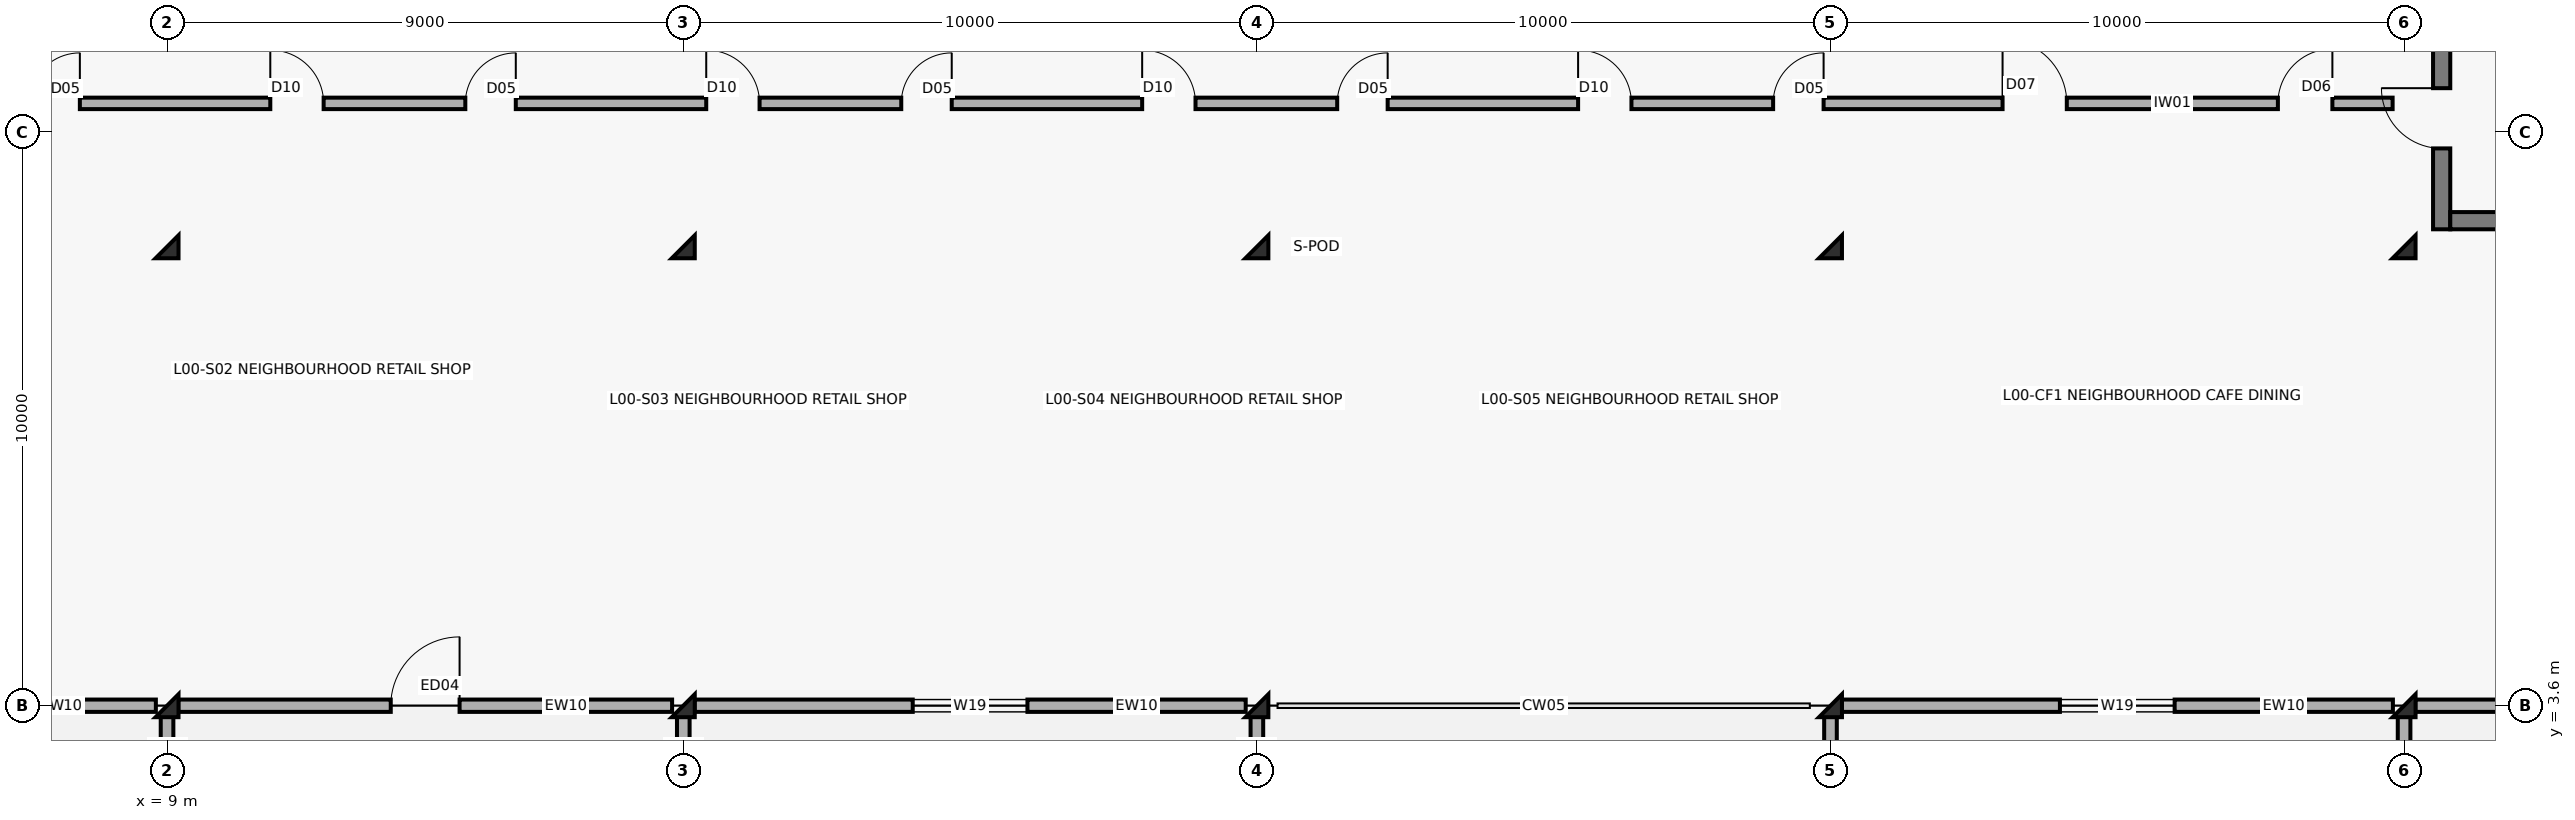
"""IFC4 building model, lengths in metres.
Left out: names, types, materials, properties, quantities, classifications, styles, units other than length and angle.
Written with IfcOpenShell. Run it as: python <this file> out.ifc"""

import sys

from ifc_helpers import new_model, si_unit, direction, frame, frame_2d, origin, origin_2d, place, context, subcontext, project, spatial, rectangle, extrude, element, fill, save


model = new_model("IFC4")
c1 = context("Model", 3, precision=1e-05, world=origin(), true_north=direction((0.0, 1.0)))
c2 = subcontext(c1, "Body", "Model", "MODEL_VIEW")
j1 = project(units=[si_unit("LENGTHUNIT", "METRE"), si_unit("PLANEANGLEUNIT", "RADIAN")], contexts=[c1])
p1 = place(None, origin())
s1 = spatial("IfcSite", under=j1, at=p1, CompositionType="ELEMENT")
p2 = place(p1, origin())
s2 = spatial("IfcBuilding", under=s1, at=p2, CompositionType="ELEMENT")
p3 = place(p2, origin())
s3 = spatial("IfcBuildingStorey", under=s2, at=p3, CompositionType="ELEMENT", Elevation=0.0)
for number, where, z_axis, x_axis in (
    (1, (9.0, 3.6, 0.0), (0.0, 0.0, 1.0), (1.0, 0.0, 0.0)),
    (2, (9.0, 11.6, 0.0), (0.0, 0.0, 1.0), (1.0, 0.0, 0.0)),
    (3, (18.0, 3.6, 0.0), (0.0, 0.0, 1.0), (1.0, 0.0, 0.0)),
    (4, (18.0, 11.6, 0.0), (0.0, 0.0, 1.0), (1.0, 0.0, 0.0)),
    (5, (28.0, 3.6, 0.0), (0.0, 0.0, 1.0), (1.0, 0.0, 0.0)),
    (6, (28.0, 11.6, 0.0), (0.0, 0.0, 1.0), (1.0, 0.0, 0.0)),
    (7, (38.0, 3.6, 0.0), (0.0, 0.0, 1.0), (1.0, 0.0, 0.0)),
    (8, (38.0, 11.6, 0.0), (0.0, 0.0, 1.0), (1.0, 0.0, 0.0)),
    (9, (48.0, 3.6, 0.0), (0.0, 0.0, 1.0), (1.0, 0.0, 0.0)),
    (10, (48.0, 11.6, 0.0), (0.0, 0.0, 1.0), (1.0, 0.0, 0.0)),
):
    element("IfcColumn", number, at=place(p3, frame(where, z_axis=z_axis, x_axis=x_axis)), inside=s3, PredefinedType="COLUMN", context=c2, shape_type="SweptSolid", body=[
        extrude(rectangle(XDim=0.4, YDim=0.4, at=origin_2d()), origin(), (0.0, 0.0, 1.0), 4.5),
    ])
p4 = place(p3, frame((0.195, 3.6, 0.0), z_axis=(0.0, 0.0, 1.0), x_axis=(1.0, 0.0, 0.0)))
e11 = element("IfcWall", 11, at=p4, inside=s3, PredefinedType="SOLIDWALL", context=c2, shape_type="SweptSolid", body=[
    extrude(rectangle(XDim=8.61, YDim=0.215, at=frame_2d((4.305, 0.0))), origin(), (0.0, 0.0, 1.0), 3.5),
])
p5 = place(p4, frame((3.305, 0.0, 0.45)))
e12 = element("IfcOpeningElement", 12, at=p5, cuts=e11, PredefinedType="OPENING", context=c2, shape_type="SweptSolid", body=[
    extrude(rectangle(XDim=2.0, YDim=2.2, at=frame_2d((1.0, 1.1))), frame((0.0, 0.117, 0.0), z_axis=(0.0, -1.0, 0.0), x_axis=(1.0, 0.0, 0.0)), (0.0, 0.0, 1.0), 0.235),
])
p6 = place(p3, frame((9.195, 3.6, 0.0), z_axis=(0.0, 0.0, 1.0), x_axis=(1.0, 0.0, 0.0)))
e13 = element("IfcWall", 13, at=p6, inside=s3, PredefinedType="SOLIDWALL", context=c2, shape_type="SweptSolid", body=[
    extrude(rectangle(XDim=8.61, YDim=0.215, at=frame_2d((4.305, 0.0))), origin(), (0.0, 0.0, 1.0), 3.5),
])
p7 = place(p6, frame((3.705, 0.0, 0.0)))
e14 = element("IfcOpeningElement", 14, at=p7, cuts=e13, PredefinedType="OPENING", context=c2, shape_type="SweptSolid", body=[
    extrude(rectangle(XDim=1.2, YDim=2.25, at=frame_2d((0.6, 1.125))), frame((0.0, 0.117, 0.0), z_axis=(0.0, -1.0, 0.0), x_axis=(1.0, 0.0, 0.0)), (0.0, 0.0, 1.0), 0.235),
])
p8 = place(p3, frame((18.195, 3.6, 0.0), z_axis=(0.0, 0.0, 1.0), x_axis=(1.0, 0.0, 0.0)))
e15 = element("IfcWall", 15, at=p8, inside=s3, PredefinedType="SOLIDWALL", context=c2, shape_type="SweptSolid", body=[
    extrude(rectangle(XDim=9.61, YDim=0.215, at=frame_2d((4.805, 0.0))), origin(), (0.0, 0.0, 1.0), 3.5),
])
p9 = place(p8, frame((3.805, 0.0, 0.45)))
e16 = element("IfcOpeningElement", 16, at=p9, cuts=e15, PredefinedType="OPENING", context=c2, shape_type="SweptSolid", body=[
    extrude(rectangle(XDim=2.0, YDim=2.2, at=frame_2d((1.0, 1.1))), frame((0.0, 0.117, 0.0), z_axis=(0.0, -1.0, 0.0), x_axis=(1.0, 0.0, 0.0)), (0.0, 0.0, 1.0), 0.235),
])
p10 = place(p3, frame((38.195, 3.6, 0.0), z_axis=(0.0, 0.0, 1.0), x_axis=(1.0, 0.0, 0.0)))
e17 = element("IfcWall", 17, at=p10, inside=s3, PredefinedType="SOLIDWALL", context=c2, shape_type="SweptSolid", body=[
    extrude(rectangle(XDim=9.61, YDim=0.215, at=frame_2d((4.805, 0.0))), origin(), (0.0, 0.0, 1.0), 3.5),
])
p11 = place(p10, frame((3.805, 0.0, 0.45)))
e18 = element("IfcOpeningElement", 18, at=p11, cuts=e17, PredefinedType="OPENING", context=c2, shape_type="SweptSolid", body=[
    extrude(rectangle(XDim=2.0, YDim=2.2, at=frame_2d((1.0, 1.1))), frame((0.0, 0.117, 0.0), z_axis=(0.0, -1.0, 0.0), x_axis=(1.0, 0.0, 0.0)), (0.0, 0.0, 1.0), 0.235),
])
p12 = place(p3, frame((48.195, 3.6, 0.0), z_axis=(0.0, 0.0, 1.0), x_axis=(1.0, 0.0, 0.0)))
e19 = element("IfcWall", 19, at=p12, inside=s3, PredefinedType="SOLIDWALL", context=c2, shape_type="SweptSolid", body=[
    extrude(rectangle(XDim=9.61, YDim=0.215, at=frame_2d((4.805, 0.0))), origin(), (0.0, 0.0, 1.0), 3.5),
])
p13 = place(p12, frame((4.205, 0.0, 0.0)))
e20 = element("IfcOpeningElement", 20, at=p13, cuts=e19, PredefinedType="OPENING", context=c2, shape_type="SweptSolid", body=[
    extrude(rectangle(XDim=1.2, YDim=2.25, at=frame_2d((0.6, 1.125))), frame((0.0, 0.117, 0.0), z_axis=(0.0, -1.0, 0.0), x_axis=(1.0, 0.0, 0.0)), (0.0, 0.0, 1.0), 0.235),
])
for number, where, z_axis, x_axis in (
    (21, (9.0, 2.55, 0.0), (0.0, 0.0, 1.0), (0.0, 1.0, 0.0)),
    (22, (18.0, 2.55, 0.0), (0.0, 0.0, 1.0), (0.0, 1.0, 0.0)),
    (23, (28.0, 2.55, 0.0), (0.0, 0.0, 1.0), (0.0, 1.0, 0.0)),
    (24, (38.0, 2.55, 0.0), (0.0, 0.0, 1.0), (0.0, 1.0, 0.0)),
    (25, (48.0, 2.55, 0.0), (0.0, 0.0, 1.0), (0.0, 1.0, 0.0)),
):
    element("IfcWall", number, at=place(p3, frame(where, z_axis=z_axis, x_axis=x_axis)), inside=s3, PredefinedType="PARAPET", context=c2, shape_type="SweptSolid", body=[
        extrude(rectangle(XDim=0.87, YDim=0.22, at=frame_2d((0.435, 0.0))), origin(), (0.0, 0.0, 1.0), 4.5),
    ])
p14 = place(p3, frame((48.655, 11.905, 0.0), z_axis=(0.0, 0.0, 1.0), x_axis=(0.0, 1.0, 0.0)))
e26 = element("IfcWall", 26, at=p14, inside=s3, PredefinedType="SHEAR", context=c2, shape_type="SweptSolid", body=[
    extrude(rectangle(XDim=3.87, YDim=0.3, at=frame_2d((1.935, 0.0))), origin(), (0.0, 0.0, 1.0), 4.5),
])
p15 = place(p14, frame((1.41, 0.0, 0.0)))
e27 = element("IfcOpeningElement", 27, at=p15, cuts=e26, PredefinedType="OPENING", context=c2, shape_type="SweptSolid", body=[
    extrude(rectangle(XDim=1.05, YDim=2.15, at=frame_2d((0.525, 1.075))), frame((0.0, 0.16, 0.0), z_axis=(0.0, -1.0, 0.0), x_axis=(1.0, 0.0, 0.0)), (0.0, 0.0, 1.0), 0.32),
])
p16 = place(p3, frame((48.805, 12.055, 0.0), z_axis=(0.0, 0.0, 1.0), x_axis=(1.0, 0.0, 0.0)))
e28 = element("IfcWall", 28, at=p16, inside=s3, PredefinedType="SHEAR", context=c2, shape_type="SweptSolid", body=[
    extrude(rectangle(XDim=7.69, YDim=0.3, at=frame_2d((3.845, 0.0))), origin(), (0.0, 0.0, 1.0), 4.5),
])
p17 = place(p3, frame((1.0, 14.1, 0.0), z_axis=(0.0, 0.0, 1.0), x_axis=(1.0, 0.0, 0.0)))
e29 = element("IfcWall", 29, at=p17, inside=s3, PredefinedType="SOLIDWALL", context=c2, shape_type="SweptSolid", body=[
    extrude(rectangle(XDim=46.8, YDim=0.2, at=frame_2d((23.4, 0.0))), origin(), (0.0, 0.0, 1.0), 3.6),
])
p18 = place(p17, frame((2.2, 0.0, 0.0)))
e30 = element("IfcOpeningElement", 30, at=p18, cuts=e29, PredefinedType="OPENING", context=c2, shape_type="SweptSolid", body=[
    extrude(rectangle(XDim=0.93, YDim=2.1, at=frame_2d((0.465, 1.05))), frame((0.0, 0.11, 0.0), z_axis=(0.0, -1.0, 0.0), x_axis=(1.0, 0.0, 0.0)), (0.0, 0.0, 1.0), 0.22),
])
p19 = place(p17, frame((5.6, 0.0, 0.0)))
e31 = element("IfcOpeningElement", 31, at=p19, cuts=e29, PredefinedType="OPENING", context=c2, shape_type="SweptSolid", body=[
    extrude(rectangle(XDim=0.88, YDim=2.1, at=frame_2d((0.44, 1.05))), frame((0.0, 0.11, 0.0), z_axis=(0.0, -1.0, 0.0), x_axis=(1.0, 0.0, 0.0)), (0.0, 0.0, 1.0), 0.22),
])
p20 = place(p17, frame((9.8, 0.0, 0.0)))
e32 = element("IfcOpeningElement", 32, at=p20, cuts=e29, PredefinedType="OPENING", context=c2, shape_type="SweptSolid", body=[
    extrude(rectangle(XDim=0.93, YDim=2.1, at=frame_2d((0.465, 1.05))), frame((0.0, 0.11, 0.0), z_axis=(0.0, -1.0, 0.0), x_axis=(1.0, 0.0, 0.0)), (0.0, 0.0, 1.0), 0.22),
])
p21 = place(p17, frame((13.2, 0.0, 0.0)))
e33 = element("IfcOpeningElement", 33, at=p21, cuts=e29, PredefinedType="OPENING", context=c2, shape_type="SweptSolid", body=[
    extrude(rectangle(XDim=0.88, YDim=2.1, at=frame_2d((0.44, 1.05))), frame((0.0, 0.11, 0.0), z_axis=(0.0, -1.0, 0.0), x_axis=(1.0, 0.0, 0.0)), (0.0, 0.0, 1.0), 0.22),
])
p22 = place(p17, frame((17.4, 0.0, 0.0)))
e34 = element("IfcOpeningElement", 34, at=p22, cuts=e29, PredefinedType="OPENING", context=c2, shape_type="SweptSolid", body=[
    extrude(rectangle(XDim=0.93, YDim=2.1, at=frame_2d((0.465, 1.05))), frame((0.0, 0.11, 0.0), z_axis=(0.0, -1.0, 0.0), x_axis=(1.0, 0.0, 0.0)), (0.0, 0.0, 1.0), 0.22),
])
p23 = place(p17, frame((20.8, 0.0, 0.0)))
e35 = element("IfcOpeningElement", 35, at=p23, cuts=e29, PredefinedType="OPENING", context=c2, shape_type="SweptSolid", body=[
    extrude(rectangle(XDim=0.88, YDim=2.1, at=frame_2d((0.44, 1.05))), frame((0.0, 0.11, 0.0), z_axis=(0.0, -1.0, 0.0), x_axis=(1.0, 0.0, 0.0)), (0.0, 0.0, 1.0), 0.22),
])
p24 = place(p17, frame((25.0, 0.0, 0.0)))
e36 = element("IfcOpeningElement", 36, at=p24, cuts=e29, PredefinedType="OPENING", context=c2, shape_type="SweptSolid", body=[
    extrude(rectangle(XDim=0.93, YDim=2.1, at=frame_2d((0.465, 1.05))), frame((0.0, 0.11, 0.0), z_axis=(0.0, -1.0, 0.0), x_axis=(1.0, 0.0, 0.0)), (0.0, 0.0, 1.0), 0.22),
])
p25 = place(p17, frame((28.4, 0.0, 0.0)))
e37 = element("IfcOpeningElement", 37, at=p25, cuts=e29, PredefinedType="OPENING", context=c2, shape_type="SweptSolid", body=[
    extrude(rectangle(XDim=0.88, YDim=2.1, at=frame_2d((0.44, 1.05))), frame((0.0, 0.11, 0.0), z_axis=(0.0, -1.0, 0.0), x_axis=(1.0, 0.0, 0.0)), (0.0, 0.0, 1.0), 0.22),
])
p26 = place(p17, frame((32.6, 0.0, 0.0)))
e38 = element("IfcOpeningElement", 38, at=p26, cuts=e29, PredefinedType="OPENING", context=c2, shape_type="SweptSolid", body=[
    extrude(rectangle(XDim=0.93, YDim=2.1, at=frame_2d((0.465, 1.05))), frame((0.0, 0.11, 0.0), z_axis=(0.0, -1.0, 0.0), x_axis=(1.0, 0.0, 0.0)), (0.0, 0.0, 1.0), 0.22),
])
p27 = place(p17, frame((36.0, 0.0, 0.0)))
e39 = element("IfcOpeningElement", 39, at=p27, cuts=e29, PredefinedType="OPENING", context=c2, shape_type="SweptSolid", body=[
    extrude(rectangle(XDim=0.88, YDim=2.1, at=frame_2d((0.44, 1.05))), frame((0.0, 0.11, 0.0), z_axis=(0.0, -1.0, 0.0), x_axis=(1.0, 0.0, 0.0)), (0.0, 0.0, 1.0), 0.22),
])
p28 = place(p17, frame((40.0, 0.0, 0.0)))
e40 = element("IfcOpeningElement", 40, at=p28, cuts=e29, PredefinedType="OPENING", context=c2, shape_type="SweptSolid", body=[
    extrude(rectangle(XDim=1.12, YDim=2.15, at=frame_2d((0.56, 1.075))), frame((0.0, 0.11, 0.0), z_axis=(0.0, -1.0, 0.0), x_axis=(1.0, 0.0, 0.0)), (0.0, 0.0, 1.0), 0.22),
])
p29 = place(p17, frame((44.8, 0.0, 0.0)))
e41 = element("IfcOpeningElement", 41, at=p29, cuts=e29, PredefinedType="OPENING", context=c2, shape_type="SweptSolid", body=[
    extrude(rectangle(XDim=0.95, YDim=2.1, at=frame_2d((0.475, 1.05))), frame((0.0, 0.11, 0.0), z_axis=(0.0, -1.0, 0.0), x_axis=(1.0, 0.0, 0.0)), (0.0, 0.0, 1.0), 0.22),
])
p30 = place(p7, origin())
e42 = element("IfcDoor", 42, at=p30, inside=s3, OperationType="SINGLE_SWING_RIGHT", PredefinedType="DOOR", context=c2, shape_type="SweptSolid", body=[
    extrude(rectangle(XDim=1.2, YDim=2.25, at=frame_2d((0.6, 1.125))), frame((0.0, 0.025, 0.0), z_axis=(0.0, -1.0, 0.0), x_axis=(1.0, 0.0, 0.0)), (0.0, 0.0, 1.0), 0.05),
])
fill(e14, e42)
p31 = place(p9, origin())
e43 = element("IfcWindow", 43, at=p31, inside=s3, PartitioningType="DOUBLE_PANEL_VERTICAL", PredefinedType="WINDOW", context=c2, shape_type="SweptSolid", body=[
    extrude(rectangle(XDim=2.0, YDim=2.2, at=frame_2d((1.0, 1.1))), frame((0.0, 0.03, 0.0), z_axis=(0.0, -1.0, 0.0), x_axis=(1.0, 0.0, 0.0)), (0.0, 0.0, 1.0), 0.06),
])
fill(e16, e43)
p32 = place(p11, origin())
e44 = element("IfcWindow", 44, at=p32, inside=s3, PartitioningType="DOUBLE_PANEL_VERTICAL", PredefinedType="WINDOW", context=c2, shape_type="SweptSolid", body=[
    extrude(rectangle(XDim=2.0, YDim=2.2, at=frame_2d((1.0, 1.1))), frame((0.0, 0.03, 0.0), z_axis=(0.0, -1.0, 0.0), x_axis=(1.0, 0.0, 0.0)), (0.0, 0.0, 1.0), 0.06),
])
fill(e18, e44)
p33 = place(p15, origin())
e45 = element("IfcDoor", 45, at=p33, inside=s3, OperationType="SINGLE_SWING_RIGHT", PredefinedType="DOOR", context=c2, shape_type="SweptSolid", body=[
    extrude(rectangle(XDim=1.05, YDim=2.15, at=frame_2d((0.525, 1.075))), frame((0.0, 0.025, 0.0), z_axis=(0.0, -1.0, 0.0), x_axis=(1.0, 0.0, 0.0)), (0.0, 0.0, 1.0), 0.05),
])
fill(e27, e45)
p34 = place(p19, origin())
e46 = element("IfcDoor", 46, at=p34, inside=s3, OperationType="SINGLE_SWING_RIGHT", PredefinedType="DOOR", context=c2, shape_type="SweptSolid", body=[
    extrude(rectangle(XDim=0.88, YDim=2.1, at=frame_2d((0.44, 1.05))), frame((0.0, 0.025, 0.0), z_axis=(0.0, -1.0, 0.0), x_axis=(1.0, 0.0, 0.0)), (0.0, 0.0, 1.0), 0.05),
])
fill(e31, e46)
p35 = place(p20, origin())
e47 = element("IfcDoor", 47, at=p35, inside=s3, OperationType="SINGLE_SWING_LEFT", PredefinedType="DOOR", context=c2, shape_type="SweptSolid", body=[
    extrude(rectangle(XDim=0.93, YDim=2.1, at=frame_2d((0.465, 1.05))), frame((0.0, 0.025, 0.0), z_axis=(0.0, -1.0, 0.0), x_axis=(1.0, 0.0, 0.0)), (0.0, 0.0, 1.0), 0.05),
])
fill(e32, e47)
p36 = place(p21, origin())
e48 = element("IfcDoor", 48, at=p36, inside=s3, OperationType="SINGLE_SWING_RIGHT", PredefinedType="DOOR", context=c2, shape_type="SweptSolid", body=[
    extrude(rectangle(XDim=0.88, YDim=2.1, at=frame_2d((0.44, 1.05))), frame((0.0, 0.025, 0.0), z_axis=(0.0, -1.0, 0.0), x_axis=(1.0, 0.0, 0.0)), (0.0, 0.0, 1.0), 0.05),
])
fill(e33, e48)
p37 = place(p22, origin())
e49 = element("IfcDoor", 49, at=p37, inside=s3, OperationType="SINGLE_SWING_LEFT", PredefinedType="DOOR", context=c2, shape_type="SweptSolid", body=[
    extrude(rectangle(XDim=0.93, YDim=2.1, at=frame_2d((0.465, 1.05))), frame((0.0, 0.025, 0.0), z_axis=(0.0, -1.0, 0.0), x_axis=(1.0, 0.0, 0.0)), (0.0, 0.0, 1.0), 0.05),
])
fill(e34, e49)
p38 = place(p23, origin())
e50 = element("IfcDoor", 50, at=p38, inside=s3, OperationType="SINGLE_SWING_RIGHT", PredefinedType="DOOR", context=c2, shape_type="SweptSolid", body=[
    extrude(rectangle(XDim=0.88, YDim=2.1, at=frame_2d((0.44, 1.05))), frame((0.0, 0.025, 0.0), z_axis=(0.0, -1.0, 0.0), x_axis=(1.0, 0.0, 0.0)), (0.0, 0.0, 1.0), 0.05),
])
fill(e35, e50)
p39 = place(p24, origin())
e51 = element("IfcDoor", 51, at=p39, inside=s3, OperationType="SINGLE_SWING_LEFT", PredefinedType="DOOR", context=c2, shape_type="SweptSolid", body=[
    extrude(rectangle(XDim=0.93, YDim=2.1, at=frame_2d((0.465, 1.05))), frame((0.0, 0.025, 0.0), z_axis=(0.0, -1.0, 0.0), x_axis=(1.0, 0.0, 0.0)), (0.0, 0.0, 1.0), 0.05),
])
fill(e36, e51)
p40 = place(p25, origin())
e52 = element("IfcDoor", 52, at=p40, inside=s3, OperationType="SINGLE_SWING_RIGHT", PredefinedType="DOOR", context=c2, shape_type="SweptSolid", body=[
    extrude(rectangle(XDim=0.88, YDim=2.1, at=frame_2d((0.44, 1.05))), frame((0.0, 0.025, 0.0), z_axis=(0.0, -1.0, 0.0), x_axis=(1.0, 0.0, 0.0)), (0.0, 0.0, 1.0), 0.05),
])
fill(e37, e52)
p41 = place(p26, origin())
e53 = element("IfcDoor", 53, at=p41, inside=s3, OperationType="SINGLE_SWING_LEFT", PredefinedType="DOOR", context=c2, shape_type="SweptSolid", body=[
    extrude(rectangle(XDim=0.93, YDim=2.1, at=frame_2d((0.465, 1.05))), frame((0.0, 0.025, 0.0), z_axis=(0.0, -1.0, 0.0), x_axis=(1.0, 0.0, 0.0)), (0.0, 0.0, 1.0), 0.05),
])
fill(e38, e53)
p42 = place(p27, origin())
e54 = element("IfcDoor", 54, at=p42, inside=s3, OperationType="SINGLE_SWING_RIGHT", PredefinedType="DOOR", context=c2, shape_type="SweptSolid", body=[
    extrude(rectangle(XDim=0.88, YDim=2.1, at=frame_2d((0.44, 1.05))), frame((0.0, 0.025, 0.0), z_axis=(0.0, -1.0, 0.0), x_axis=(1.0, 0.0, 0.0)), (0.0, 0.0, 1.0), 0.05),
])
fill(e39, e54)
p43 = place(p28, origin())
e55 = element("IfcDoor", 55, at=p43, inside=s3, OperationType="SINGLE_SWING_LEFT", PredefinedType="DOOR", context=c2, shape_type="SweptSolid", body=[
    extrude(rectangle(XDim=1.12, YDim=2.15, at=frame_2d((0.56, 1.075))), frame((0.0, 0.025, 0.0), z_axis=(0.0, -1.0, 0.0), x_axis=(1.0, 0.0, 0.0)), (0.0, 0.0, 1.0), 0.05),
])
fill(e40, e55)
p44 = place(p29, origin())
e56 = element("IfcDoor", 56, at=p44, inside=s3, OperationType="SINGLE_SWING_RIGHT", PredefinedType="DOOR", context=c2, shape_type="SweptSolid", body=[
    extrude(rectangle(XDim=0.95, YDim=2.1, at=frame_2d((0.475, 1.05))), frame((0.0, 0.025, 0.0), z_axis=(0.0, -1.0, 0.0), x_axis=(1.0, 0.0, 0.0)), (0.0, 0.0, 1.0), 0.05),
])
fill(e41, e56)
save(model, sys.argv[1])
